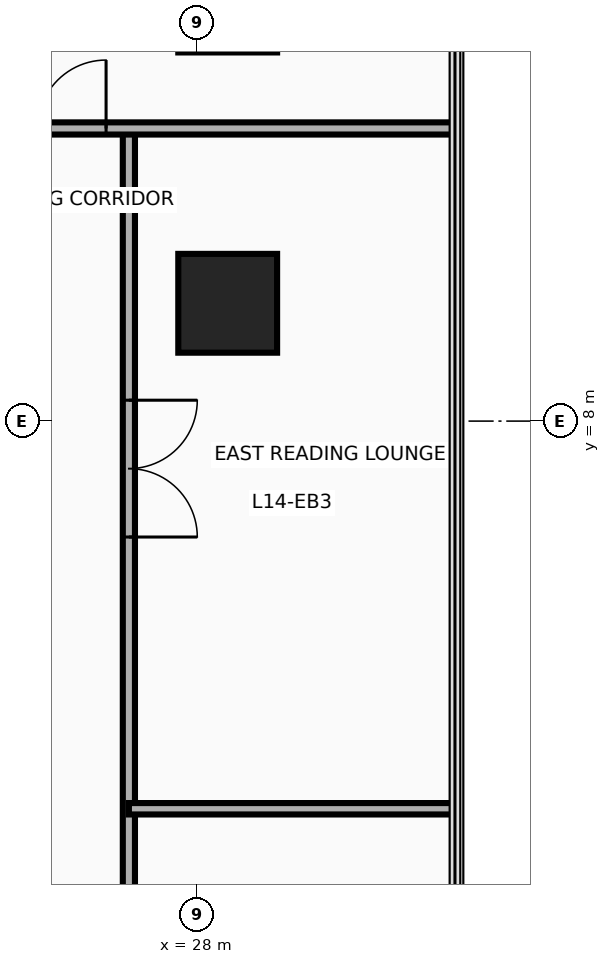
"""IFC4 building model, lengths in metres.
Left out: names, types, materials, properties, quantities, classifications, styles, units other than length and angle.
Written with IfcOpenShell. Run it as: python <this file> out.ifc"""

import sys

from ifc_helpers import new_model, si_unit, direction, frame, frame_2d, origin, origin_2d, place, context, subcontext, project, spatial, rectangle, circle, extrude, source, transform, mapped, element, fill, save


model = new_model("IFC4")
c1 = context("Model", 3, precision=1e-05, world=origin(), true_north=direction((0.0, 1.0)))
c2 = subcontext(c1, "Body", "Model", "MODEL_VIEW")
j1 = project(units=[si_unit("LENGTHUNIT", "METRE"), si_unit("PLANEANGLEUNIT", "RADIAN")], contexts=[c1])
p1 = place(None, origin())
s1 = spatial("IfcSite", under=j1, at=p1, CompositionType="ELEMENT")
p2 = place(p1, origin())
s2 = spatial("IfcBuilding", under=s1, at=p2, CompositionType="ELEMENT")
p3 = place(p2, frame((0.0, 0.0, 59.3)))
s3 = spatial("IfcBuildingStorey", under=s2, at=p3, CompositionType="ELEMENT", Elevation=59.3)
m1 = source(origin(), c2, "Body", "SweptSolid", [
    extrude(circle(Radius=0.65, at=origin_2d()), origin(), (0.0, 0.0, 1.0), 3.7),
])
p4 = place(p3, frame((28.4, 9.55, 0.0), z_axis=(0.0, 0.0, 1.0), x_axis=(1.0, 0.0, 0.0)))
e1 = element("IfcColumn", 1, at=p4, inside=s3, PredefinedType="COLUMN", context=c2, shape_type="MappedRepresentation", body=[
    mapped(m1, transform((0.0, 0.0, 0.0), x_axis=(1.0, 0.0, 0.0), y_axis=(0.0, 1.0, 0.0), z_axis=(0.0, 0.0, 1.0), scale=1.0)),
])
p5 = place(p3, frame((27.1, -13.89, 0.0), z_axis=(0.0, 0.0, 1.0), x_axis=(0.0, 1.0, 0.0)))
e2 = element("IfcWall", 2, at=p5, inside=s3, PredefinedType="PARTITIONING", context=c2, shape_type="SweptSolid", body=[
    extrude(rectangle(XDim=25.74, YDim=0.16, at=frame_2d((12.87, 0.0))), origin(), (0.0, 0.0, 1.0), 2.583),
])
p6 = place(p5, frame((1.76, 0.0, 0.0)))
e3 = element("IfcOpeningElement", 3, at=p6, cuts=e2, PredefinedType="OPENING", context=c2, shape_type="SweptSolid", body=[
    extrude(rectangle(XDim=1.8, YDim=2.15, at=frame_2d((0.9, 1.075))), frame((0.0, 0.095, 0.0), z_axis=(0.0, -1.0, 0.0), x_axis=(1.0, 0.0, 0.0)), (0.0, 0.0, 1.0), 0.19),
])
p7 = place(p5, frame((12.16, 0.0, 0.0)))
e4 = element("IfcOpeningElement", 4, at=p7, cuts=e2, PredefinedType="OPENING", context=c2, shape_type="SweptSolid", body=[
    extrude(rectangle(XDim=1.8, YDim=2.15, at=frame_2d((0.9, 1.075))), frame((0.0, 0.095, 0.0), z_axis=(0.0, -1.0, 0.0), x_axis=(1.0, 0.0, 0.0)), (0.0, 0.0, 1.0), 0.19),
])
p8 = place(p5, frame((20.365, 0.0, 0.0)))
e5 = element("IfcOpeningElement", 5, at=p8, cuts=e2, PredefinedType="OPENING", context=c2, shape_type="SweptSolid", body=[
    extrude(rectangle(XDim=1.8, YDim=2.15, at=frame_2d((0.9, 1.075))), frame((0.0, 0.095, 0.0), z_axis=(0.0, -1.0, 0.0), x_axis=(1.0, 0.0, 0.0)), (0.0, 0.0, 1.0), 0.19),
])
p9 = place(p3, frame((25.6, 11.85, 0.0), z_axis=(0.0, 0.0, 1.0), x_axis=(1.0, 0.0, 0.0)))
e6 = element("IfcWall", 6, at=p9, inside=s3, PredefinedType="PARTITIONING", context=c2, shape_type="SweptSolid", body=[
    extrude(rectangle(XDim=5.79, YDim=0.16, at=frame_2d((2.895, 0.0))), origin(), (0.0, 0.0, 1.0), 2.896),
])
p10 = place(p9, frame((0.3, 0.0, 0.0)))
e7 = element("IfcOpeningElement", 7, at=p10, cuts=e6, PredefinedType="OPENING", context=c2, shape_type="SweptSolid", body=[
    extrude(rectangle(XDim=0.9, YDim=2.1, at=frame_2d((0.45, 1.05))), frame((0.0, 0.095, 0.0), z_axis=(0.0, -1.0, 0.0), x_axis=(1.0, 0.0, 0.0)), (0.0, 0.0, 1.0), 0.19),
])
p11 = place(p3, frame((27.1, 2.9, 0.0), z_axis=(0.0, 0.0, 1.0), x_axis=(1.0, 0.0, 0.0)))
e8 = element("IfcWall", 8, at=p11, inside=s3, PredefinedType="PARTITIONING", context=c2, shape_type="SweptSolid", body=[
    extrude(rectangle(XDim=4.29, YDim=0.15, at=frame_2d((2.145, 0.0))), origin(), (0.0, 0.0, 1.0), 2.896),
])
p12 = place(p10, origin())
e9 = element("IfcDoor", 9, at=p12, inside=s3, OperationType="SINGLE_SWING_RIGHT", PredefinedType="DOOR", context=c2, shape_type="SweptSolid", body=[
    extrude(rectangle(XDim=0.9, YDim=2.1, at=frame_2d((0.45, 1.05))), frame((0.0, 0.025, 0.0), z_axis=(0.0, -1.0, 0.0), x_axis=(1.0, 0.0, 0.0)), (0.0, 0.0, 1.0), 0.05),
])
fill(e7, e9)
p13 = place(p8, frame((1.8, 0.0, 0.0), z_axis=(0.0, 0.0, 1.0), x_axis=(-1.0, 0.0, 0.0)))
e10 = element("IfcDoor", 10, at=p13, inside=s3, OperationType="DOUBLE_DOOR_SINGLE_SWING", PredefinedType="DOOR", context=c2, shape_type="SweptSolid", body=[
    extrude(rectangle(XDim=1.8, YDim=2.15, at=frame_2d((0.9, 1.075))), frame((0.0, 0.025, 0.0), z_axis=(0.0, -1.0, 0.0), x_axis=(1.0, 0.0, 0.0)), (0.0, 0.0, 1.0), 0.05),
])
fill(e5, e10)
save(model, sys.argv[1])
